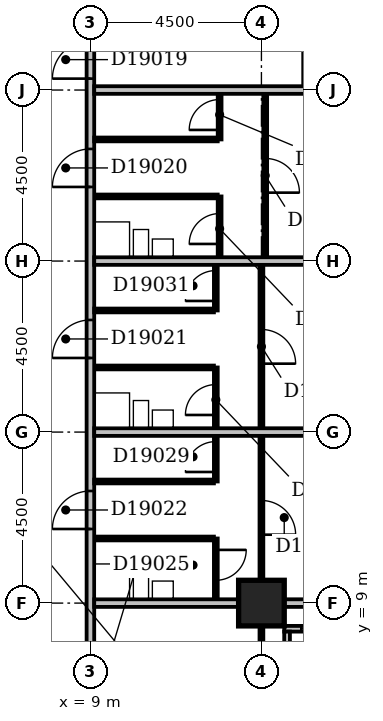
"""IFC4 building model, lengths in metres.
Left out: names, types, materials, properties, quantities, classifications, styles, units other than length and angle.
Written with IfcOpenShell. Run it as: python <this file> out.ifc"""

import sys

from ifc_helpers import new_model, si_unit, direction, frame, frame_2d, origin, origin_2d, place, context, subcontext, project, spatial, rectangle, extrude, element, fill, save


model = new_model("IFC4")
c1 = context("Model", 3, precision=1e-05, world=origin(), true_north=direction((0.0, 1.0)))
c2 = subcontext(c1, "Body", "Model", "MODEL_VIEW")
j1 = project(units=[si_unit("LENGTHUNIT", "METRE"), si_unit("PLANEANGLEUNIT", "RADIAN")], contexts=[c1])
p1 = place(None, origin())
s1 = spatial("IfcSite", under=j1, at=p1, CompositionType="ELEMENT")
p2 = place(p1, origin())
s2 = spatial("IfcBuilding", under=s1, at=p2, CompositionType="ELEMENT")
p3 = place(p2, frame((0.0, 0.0, 79.4)))
s3 = spatial("IfcBuildingStorey", under=s2, at=p3, CompositionType="ELEMENT", Elevation=79.4)
p4 = place(p3, frame((13.5, 9.0, -0.3), z_axis=(0.0, 0.0, 1.0), x_axis=(1.0, 0.0, 0.0)))
e1 = element("IfcColumn", 1, at=p4, inside=s3, PredefinedType="COLUMN", context=c2, shape_type="SweptSolid", body=[
    extrude(rectangle(XDim=1.2, YDim=1.2, at=origin_2d()), origin(), (0.0, 0.0, 1.0), 3.6),
])
p5 = place(p3, frame((14.175, 3.9, 0.0), z_axis=(0.0, 0.0, 1.0), x_axis=(0.0, 1.0, 0.0)))
e2 = element("IfcWall", 2, at=p5, inside=s3, PredefinedType="STANDARD", context=c2, shape_type="SweptSolid", body=[
    extrude(rectangle(XDim=4.35, YDim=0.15, at=frame_2d((2.175, 0.0))), origin(), (0.0, 0.0, 1.0), 2.7),
])
p6 = place(p5, frame((1.65, 0.0, 0.6)))
e3 = element("IfcOpeningElement", 3, at=p6, cuts=e2, PredefinedType="OPENING", context=c2, shape_type="SweptSolid", body=[
    extrude(rectangle(XDim=2.4, YDim=1.8, at=frame_2d((1.2, 0.9))), frame((0.0, 0.087, 0.0), z_axis=(0.0, -1.0, 0.0), x_axis=(1.0, 0.0, 0.0)), (0.0, 0.0, 1.0), 0.174),
])
p7 = place(p3, frame((14.1, 8.325, 0.0), z_axis=(0.0, 0.0, 1.0), x_axis=(1.0, 0.0, 0.0)))
e4 = element("IfcWall", 4, at=p7, inside=s3, PredefinedType="STANDARD", context=c2, shape_type="SweptSolid", body=[
    extrude(rectangle(XDim=4.65, YDim=0.15, at=frame_2d((2.325, 0.0))), origin(), (0.0, 0.0, 1.0), 2.7),
])
p8 = place(p7, frame((0.45, 0.0, 0.6)))
e5 = element("IfcOpeningElement", 5, at=p8, cuts=e4, PredefinedType="OPENING", context=c2, shape_type="SweptSolid", body=[
    extrude(rectangle(XDim=2.4, YDim=1.8, at=frame_2d((1.2, 0.9))), frame((0.0, 0.087, 0.0), z_axis=(0.0, -1.0, 0.0), x_axis=(1.0, 0.0, 0.0)), (0.0, 0.0, 1.0), 0.174),
])
p9 = place(p3, frame((9.0, 5.0, 0.0), z_axis=(0.0, 0.0, 1.0), x_axis=(0.0, 1.0, 0.0)))
e6 = element("IfcWall", 6, at=p9, inside=s3, PredefinedType="PARTITIONING", context=c2, shape_type="SweptSolid", body=[
    extrude(rectangle(XDim=44.5, YDim=0.2, at=frame_2d((22.25, 0.0))), origin(), (0.0, 0.0, 1.0), 3.3),
])
p10 = place(p9, frame((17.8, 0.0, 0.0)))
e7 = element("IfcOpeningElement", 7, at=p10, cuts=e6, PredefinedType="OPENING", context=c2, shape_type="SweptSolid", body=[
    extrude(rectangle(XDim=1.0, YDim=2.1, at=frame_2d((0.5, 1.05))), frame((0.0, 0.112, 0.0), z_axis=(0.0, -1.0, 0.0), x_axis=(1.0, 0.0, 0.0)), (0.0, 0.0, 1.0), 0.224),
])
p11 = place(p9, frame((14.95, 0.0, 0.0)))
e8 = element("IfcOpeningElement", 8, at=p11, cuts=e6, PredefinedType="OPENING", context=c2, shape_type="SweptSolid", body=[
    extrude(rectangle(XDim=1.0, YDim=2.1, at=frame_2d((0.5, 1.05))), frame((0.0, 0.112, 0.0), z_axis=(0.0, -1.0, 0.0), x_axis=(1.0, 0.0, 0.0)), (0.0, 0.0, 1.0), 0.224),
])
p12 = place(p9, frame((10.45, 0.0, 0.0)))
e9 = element("IfcOpeningElement", 9, at=p12, cuts=e6, PredefinedType="OPENING", context=c2, shape_type="SweptSolid", body=[
    extrude(rectangle(XDim=1.0, YDim=2.1, at=frame_2d((0.5, 1.05))), frame((0.0, 0.112, 0.0), z_axis=(0.0, -1.0, 0.0), x_axis=(1.0, 0.0, 0.0)), (0.0, 0.0, 1.0), 0.224),
])
p13 = place(p9, frame((5.95, 0.0, 0.0)))
e10 = element("IfcOpeningElement", 10, at=p13, cuts=e6, PredefinedType="OPENING", context=c2, shape_type="SweptSolid", body=[
    extrude(rectangle(XDim=1.0, YDim=2.1, at=frame_2d((0.5, 1.05))), frame((0.0, 0.112, 0.0), z_axis=(0.0, -1.0, 0.0), x_axis=(1.0, 0.0, 0.0)), (0.0, 0.0, 1.0), 0.224),
])
p14 = place(p9, frame((35.0, 0.0, 0.0)))
e11 = element("IfcOpeningElement", 11, at=p14, cuts=e6, PredefinedType="OPENING", context=c2, shape_type="SweptSolid", body=[
    extrude(rectangle(XDim=0.9, YDim=2.1, at=frame_2d((0.45, 1.05))), frame((0.0, 0.112, 0.0), z_axis=(0.0, -1.0, 0.0), x_axis=(1.0, 0.0, 0.0)), (0.0, 0.0, 1.0), 0.224),
])
p15 = place(p9, frame((1.5, 0.0, 0.0)))
e12 = element("IfcOpeningElement", 12, at=p15, cuts=e6, PredefinedType="OPENING", context=c2, shape_type="SweptSolid", body=[
    extrude(rectangle(XDim=0.9, YDim=2.1, at=frame_2d((0.45, 1.05))), frame((0.0, 0.112, 0.0), z_axis=(0.0, -1.0, 0.0), x_axis=(1.0, 0.0, 0.0)), (0.0, 0.0, 1.0), 0.224),
])
p16 = place(p3, frame((13.5, 5.1, 0.0), z_axis=(0.0, 0.0, 1.0), x_axis=(0.0, 1.0, 0.0)))
e13 = element("IfcWall", 13, at=p16, inside=s3, PredefinedType="PARTITIONING", context=c2, shape_type="SweptSolid", body=[
    extrude(rectangle(XDim=3.3, YDim=0.1, at=frame_2d((1.65, 0.0))), origin(), (0.0, 0.0, 1.0), 2.7),
])
p17 = place(p3, frame((9.1, 9.0, 0.0), z_axis=(0.0, 0.0, 1.0), x_axis=(1.0, 0.0, 0.0)))
e14 = element("IfcWall", 14, at=p17, inside=s3, PredefinedType="PARTITIONING", context=c2, shape_type="SweptSolid", body=[
    extrude(rectangle(XDim=3.8, YDim=0.2, at=frame_2d((1.9, 0.0))), origin(), (0.0, 0.0, 1.0), 3.3),
])
p18 = place(p3, frame((14.1, 9.0, 0.0), z_axis=(0.0, 0.0, 1.0), x_axis=(1.0, 0.0, 0.0)))
e15 = element("IfcWall", 15, at=p18, inside=s3, PredefinedType="PARTITIONING", context=c2, shape_type="SweptSolid", body=[
    extrude(rectangle(XDim=3.3, YDim=0.2, at=frame_2d((1.65, 0.0))), origin(), (0.0, 0.0, 1.0), 2.7),
])
p19 = place(p3, frame((12.3, 9.1, 0.0), z_axis=(0.0, 0.0, 1.0), x_axis=(0.0, 1.0, 0.0)))
e16 = element("IfcWall", 16, at=p19, inside=s3, PredefinedType="PARTITIONING", context=c2, shape_type="SweptSolid", body=[
    extrude(rectangle(XDim=1.6, YDim=0.1, at=frame_2d((0.8, 0.0))), origin(), (0.0, 0.0, 1.0), 3.3),
])
p20 = place(p19, frame((0.5, 0.0, 0.0)))
e17 = element("IfcOpeningElement", 17, at=p20, cuts=e16, PredefinedType="OPENING", context=c2, shape_type="SweptSolid", body=[
    extrude(rectangle(XDim=0.8, YDim=2.1, at=frame_2d((0.4, 1.05))), frame((0.0, 0.062, 0.0), z_axis=(0.0, -1.0, 0.0), x_axis=(1.0, 0.0, 0.0)), (0.0, 0.0, 1.0), 0.124),
])
p21 = place(p3, frame((13.5, 9.6, 0.0), z_axis=(0.0, 0.0, 1.0), x_axis=(0.0, 1.0, 0.0)))
e18 = element("IfcWall", 18, at=p21, inside=s3, PredefinedType="PARTITIONING", context=c2, shape_type="SweptSolid", body=[
    extrude(rectangle(XDim=8.3, YDim=0.1, at=frame_2d((4.15, 0.0))), origin(), (0.0, 0.0, 1.0), 3.3),
])
p22 = place(p21, frame((5.7, 0.0, 0.0)))
e19 = element("IfcOpeningElement", 19, at=p22, cuts=e18, PredefinedType="OPENING", context=c2, shape_type="SweptSolid", body=[
    extrude(rectangle(XDim=0.9, YDim=2.1, at=frame_2d((0.45, 1.05))), frame((0.0, 0.062, 0.0), z_axis=(0.0, -1.0, 0.0), x_axis=(1.0, 0.0, 0.0)), (0.0, 0.0, 1.0), 0.124),
])
p23 = place(p21, frame((1.2, 0.0, 0.0)))
e20 = element("IfcOpeningElement", 20, at=p23, cuts=e18, PredefinedType="OPENING", context=c2, shape_type="SweptSolid", body=[
    extrude(rectangle(XDim=0.9, YDim=2.1, at=frame_2d((0.45, 1.05))), frame((0.0, 0.062, 0.0), z_axis=(0.0, -1.0, 0.0), x_axis=(1.0, 0.0, 0.0)), (0.0, 0.0, 1.0), 0.124),
])
p24 = place(p3, frame((9.1, 10.7, 0.0), z_axis=(0.0, 0.0, 1.0), x_axis=(1.0, 0.0, 0.0)))
e21 = element("IfcWall", 21, at=p24, inside=s3, PredefinedType="PLUMBINGWALL", context=c2, shape_type="SweptSolid", body=[
    extrude(rectangle(XDim=3.15, YDim=0.1, at=frame_2d((1.575, 0.0))), origin(), (0.0, 0.0, 1.0), 3.3),
])
p25 = place(p3, frame((9.1, 12.2, 0.0), z_axis=(0.0, 0.0, 1.0), x_axis=(1.0, 0.0, 0.0)))
e22 = element("IfcWall", 22, at=p25, inside=s3, PredefinedType="PARTITIONING", context=c2, shape_type="SweptSolid", body=[
    extrude(rectangle(XDim=3.15, YDim=0.1, at=frame_2d((1.575, 0.0))), origin(), (0.0, 0.0, 1.0), 3.3),
])
p26 = place(p3, frame((12.3, 12.2, 0.0), z_axis=(0.0, 0.0, 1.0), x_axis=(0.0, 1.0, 0.0)))
e23 = element("IfcWall", 23, at=p26, inside=s3, PredefinedType="PARTITIONING", context=c2, shape_type="SweptSolid", body=[
    extrude(rectangle(XDim=3.0, YDim=0.1, at=frame_2d((1.5, 0.0))), origin(), (0.0, 0.0, 1.0), 3.3),
])
p27 = place(p26, frame((1.75, 0.0, 0.0)))
e24 = element("IfcOpeningElement", 24, at=p27, cuts=e23, PredefinedType="OPENING", context=c2, shape_type="SweptSolid", body=[
    extrude(rectangle(XDim=0.8, YDim=2.1, at=frame_2d((0.4, 1.05))), frame((0.0, 0.062, 0.0), z_axis=(0.0, -1.0, 0.0), x_axis=(1.0, 0.0, 0.0)), (0.0, 0.0, 1.0), 0.124),
])
p28 = place(p26, frame((0.25, 0.0, 0.0)))
e25 = element("IfcOpeningElement", 25, at=p28, cuts=e23, PredefinedType="OPENING", context=c2, shape_type="SweptSolid", body=[
    extrude(rectangle(XDim=0.8, YDim=2.1, at=frame_2d((0.4, 1.05))), frame((0.0, 0.062, 0.0), z_axis=(0.0, -1.0, 0.0), x_axis=(1.0, 0.0, 0.0)), (0.0, 0.0, 1.0), 0.124),
])
p29 = place(p3, frame((9.1, 13.5, 0.0), z_axis=(0.0, 0.0, 1.0), x_axis=(1.0, 0.0, 0.0)))
e26 = element("IfcWall", 26, at=p29, inside=s3, PredefinedType="PARTITIONING", context=c2, shape_type="SweptSolid", body=[
    extrude(rectangle(XDim=8.3, YDim=0.2, at=frame_2d((4.15, 0.0))), origin(), (0.0, 0.0, 1.0), 3.3),
])
p30 = place(p3, frame((9.1, 15.2, 0.0), z_axis=(0.0, 0.0, 1.0), x_axis=(1.0, 0.0, 0.0)))
e27 = element("IfcWall", 27, at=p30, inside=s3, PredefinedType="PLUMBINGWALL", context=c2, shape_type="SweptSolid", body=[
    extrude(rectangle(XDim=3.15, YDim=0.1, at=frame_2d((1.575, 0.0))), origin(), (0.0, 0.0, 1.0), 3.3),
])
p31 = place(p3, frame((9.1, 16.7, 0.0), z_axis=(0.0, 0.0, 1.0), x_axis=(1.0, 0.0, 0.0)))
e28 = element("IfcWall", 28, at=p31, inside=s3, PredefinedType="PARTITIONING", context=c2, shape_type="SweptSolid", body=[
    extrude(rectangle(XDim=3.15, YDim=0.1, at=frame_2d((1.575, 0.0))), origin(), (0.0, 0.0, 1.0), 3.3),
])
p32 = place(p3, frame((12.3, 16.7, 0.0), z_axis=(0.0, 0.0, 1.0), x_axis=(0.0, 1.0, 0.0)))
e29 = element("IfcWall", 29, at=p32, inside=s3, PredefinedType="PARTITIONING", context=c2, shape_type="SweptSolid", body=[
    extrude(rectangle(XDim=1.2, YDim=0.1, at=frame_2d((0.6, 0.0))), origin(), (0.0, 0.0, 1.0), 3.3),
])
p33 = place(p32, frame((0.25, 0.0, 0.0)))
e30 = element("IfcOpeningElement", 30, at=p33, cuts=e29, PredefinedType="OPENING", context=c2, shape_type="SweptSolid", body=[
    extrude(rectangle(XDim=0.8, YDim=2.1, at=frame_2d((0.4, 1.05))), frame((0.0, 0.062, 0.0), z_axis=(0.0, -1.0, 0.0), x_axis=(1.0, 0.0, 0.0)), (0.0, 0.0, 1.0), 0.124),
])
p34 = place(p3, frame((9.1, 18.0, 0.0), z_axis=(0.0, 0.0, 1.0), x_axis=(1.0, 0.0, 0.0)))
e31 = element("IfcWall", 31, at=p34, inside=s3, PredefinedType="PARTITIONING", context=c2, shape_type="SweptSolid", body=[
    extrude(rectangle(XDim=8.3, YDim=0.2, at=frame_2d((4.15, 0.0))), origin(), (0.0, 0.0, 1.0), 2.6),
])
p35 = place(p3, frame((12.4, 18.1, 0.0), z_axis=(0.0, 0.0, 1.0), x_axis=(0.0, 1.0, 0.0)))
e32 = element("IfcWall", 32, at=p35, inside=s3, PredefinedType="PARTITIONING", context=c2, shape_type="SweptSolid", body=[
    extrude(rectangle(XDim=1.6, YDim=0.1, at=frame_2d((0.8, 0.0))), origin(), (0.0, 0.0, 1.0), 3.3),
])
p36 = place(p35, frame((0.35, 0.0, 0.0)))
e33 = element("IfcOpeningElement", 33, at=p36, cuts=e32, PredefinedType="OPENING", context=c2, shape_type="SweptSolid", body=[
    extrude(rectangle(XDim=0.8, YDim=2.1, at=frame_2d((0.4, 1.05))), frame((0.0, 0.062, 0.0), z_axis=(0.0, -1.0, 0.0), x_axis=(1.0, 0.0, 0.0)), (0.0, 0.0, 1.0), 0.124),
])
p37 = place(p3, frame((13.6, 18.1, 0.0), z_axis=(0.0, 0.0, 1.0), x_axis=(0.0, 1.0, 0.0)))
e34 = element("IfcWall", 34, at=p37, inside=s3, PredefinedType="PARTITIONING", context=c2, shape_type="SweptSolid", body=[
    extrude(rectangle(XDim=4.3, YDim=0.1, at=frame_2d((2.15, 0.0))), origin(), (0.0, 0.0, 1.0), 3.3),
])
p38 = place(p37, frame((1.7, 0.0, 0.0)))
e35 = element("IfcOpeningElement", 35, at=p38, cuts=e34, PredefinedType="OPENING", context=c2, shape_type="SweptSolid", body=[
    extrude(rectangle(XDim=0.9, YDim=2.1, at=frame_2d((0.45, 1.05))), frame((0.0, 0.062, 0.0), z_axis=(0.0, -1.0, 0.0), x_axis=(1.0, 0.0, 0.0)), (0.0, 0.0, 1.0), 0.124),
])
p39 = place(p3, frame((9.1, 19.7, 0.0), z_axis=(0.0, 0.0, 1.0), x_axis=(1.0, 0.0, 0.0)))
e36 = element("IfcWall", 36, at=p39, inside=s3, PredefinedType="PLUMBINGWALL", context=c2, shape_type="SweptSolid", body=[
    extrude(rectangle(XDim=3.25, YDim=0.1, at=frame_2d((1.625, 0.0))), origin(), (0.0, 0.0, 1.0), 3.3),
])
p40 = place(p3, frame((9.1, 21.2, 0.0), z_axis=(0.0, 0.0, 1.0), x_axis=(1.0, 0.0, 0.0)))
e37 = element("IfcWall", 37, at=p40, inside=s3, PredefinedType="PARTITIONING", context=c2, shape_type="SweptSolid", body=[
    extrude(rectangle(XDim=3.25, YDim=0.1, at=frame_2d((1.625, 0.0))), origin(), (0.0, 0.0, 1.0), 3.3),
])
p41 = place(p3, frame((12.4, 21.2, 0.0), z_axis=(0.0, 0.0, 1.0), x_axis=(0.0, 1.0, 0.0)))
e38 = element("IfcWall", 38, at=p41, inside=s3, PredefinedType="PARTITIONING", context=c2, shape_type="SweptSolid", body=[
    extrude(rectangle(XDim=1.2, YDim=0.1, at=frame_2d((0.6, 0.0))), origin(), (0.0, 0.0, 1.0), 3.3),
])
p42 = place(p41, frame((0.25, 0.0, 0.0)))
e39 = element("IfcOpeningElement", 39, at=p42, cuts=e38, PredefinedType="OPENING", context=c2, shape_type="SweptSolid", body=[
    extrude(rectangle(XDim=0.8, YDim=2.1, at=frame_2d((0.4, 1.05))), frame((0.0, 0.062, 0.0), z_axis=(0.0, -1.0, 0.0), x_axis=(1.0, 0.0, 0.0)), (0.0, 0.0, 1.0), 0.124),
])
p43 = place(p3, frame((9.1, 22.5, 0.0), z_axis=(0.0, 0.0, 1.0), x_axis=(1.0, 0.0, 0.0)))
e40 = element("IfcWall", 40, at=p43, inside=s3, PredefinedType="PARTITIONING", context=c2, shape_type="SweptSolid", body=[
    extrude(rectangle(XDim=12.8, YDim=0.2, at=frame_2d((6.4, 0.0))), origin(), (0.0, 0.0, 1.0), 3.3),
])
p44 = place(p3, frame((14.65, 22.6, 0.0), z_axis=(0.0, 0.0, 1.0), x_axis=(0.0, 1.0, 0.0)))
e41 = element("IfcWall", 41, at=p44, inside=s3, PredefinedType="PARTITIONING", context=c2, shape_type="SweptSolid", body=[
    extrude(rectangle(XDim=13.3, YDim=0.1, at=frame_2d((6.65, 0.0))), origin(), (0.0, 0.0, 1.0), 3.3),
])
p45 = place(p44, frame((1.7, 0.0, 0.0)))
e42 = element("IfcOpeningElement", 42, at=p45, cuts=e41, PredefinedType="OPENING", context=c2, shape_type="SweptSolid", body=[
    extrude(rectangle(XDim=0.9, YDim=2.1, at=frame_2d((0.45, 1.05))), frame((0.0, 0.062, 0.0), z_axis=(0.0, -1.0, 0.0), x_axis=(1.0, 0.0, 0.0)), (0.0, 0.0, 1.0), 0.124),
])
p46 = place(p44, frame((6.2, 0.0, 0.0)))
e43 = element("IfcOpeningElement", 43, at=p46, cuts=e41, PredefinedType="OPENING", context=c2, shape_type="SweptSolid", body=[
    extrude(rectangle(XDim=0.9, YDim=2.1, at=frame_2d((0.45, 1.05))), frame((0.0, 0.062, 0.0), z_axis=(0.0, -1.0, 0.0), x_axis=(1.0, 0.0, 0.0)), (0.0, 0.0, 1.0), 0.124),
])
p47 = place(p44, frame((10.7, 0.0, 0.0)))
e44 = element("IfcOpeningElement", 44, at=p47, cuts=e41, PredefinedType="OPENING", context=c2, shape_type="SweptSolid", body=[
    extrude(rectangle(XDim=0.9, YDim=2.1, at=frame_2d((0.45, 1.05))), frame((0.0, 0.062, 0.0), z_axis=(0.0, -1.0, 0.0), x_axis=(1.0, 0.0, 0.0)), (0.0, 0.0, 1.0), 0.124),
])
p48 = place(p8, origin())
e45 = element("IfcWindow", 45, at=p48, inside=s3, PartitioningType="SINGLE_PANEL", PredefinedType="WINDOW", context=c2, shape_type="SweptSolid", body=[
    extrude(rectangle(XDim=2.4, YDim=1.8, at=frame_2d((1.2, 0.9))), frame((0.0, 0.03, 0.0), z_axis=(0.0, -1.0, 0.0), x_axis=(1.0, 0.0, 0.0)), (0.0, 0.0, 1.0), 0.06),
])
fill(e5, e45)
p49 = place(p10, origin())
e46 = element("IfcDoor", 46, at=p49, inside=s3, OperationType="SINGLE_SWING_LEFT", PredefinedType="DOOR", context=c2, shape_type="SweptSolid", body=[
    extrude(rectangle(XDim=1.0, YDim=2.1, at=frame_2d((0.5, 1.05))), frame((0.0, 0.025, 0.0), z_axis=(0.0, -1.0, 0.0), x_axis=(1.0, 0.0, 0.0)), (0.0, 0.0, 1.0), 0.05),
])
fill(e7, e46)
p50 = place(p11, origin())
e47 = element("IfcDoor", 47, at=p50, inside=s3, OperationType="SINGLE_SWING_LEFT", PredefinedType="DOOR", context=c2, shape_type="SweptSolid", body=[
    extrude(rectangle(XDim=1.0, YDim=2.1, at=frame_2d((0.5, 1.05))), frame((0.0, 0.025, 0.0), z_axis=(0.0, -1.0, 0.0), x_axis=(1.0, 0.0, 0.0)), (0.0, 0.0, 1.0), 0.05),
])
fill(e8, e47)
p51 = place(p12, origin())
e48 = element("IfcDoor", 48, at=p51, inside=s3, OperationType="SINGLE_SWING_LEFT", PredefinedType="DOOR", context=c2, shape_type="SweptSolid", body=[
    extrude(rectangle(XDim=1.0, YDim=2.1, at=frame_2d((0.5, 1.05))), frame((0.0, 0.025, 0.0), z_axis=(0.0, -1.0, 0.0), x_axis=(1.0, 0.0, 0.0)), (0.0, 0.0, 1.0), 0.05),
])
fill(e9, e48)
p52 = place(p13, origin())
e49 = element("IfcDoor", 49, at=p52, inside=s3, OperationType="SINGLE_SWING_LEFT", PredefinedType="DOOR", context=c2, shape_type="SweptSolid", body=[
    extrude(rectangle(XDim=1.0, YDim=2.1, at=frame_2d((0.5, 1.05))), frame((0.0, 0.025, 0.0), z_axis=(0.0, -1.0, 0.0), x_axis=(1.0, 0.0, 0.0)), (0.0, 0.0, 1.0), 0.05),
])
fill(e10, e49)
p53 = place(p20, origin())
e50 = element("IfcDoor", 50, at=p53, inside=s3, OperationType="SINGLE_SWING_RIGHT", PredefinedType="DOOR", context=c2, shape_type="SweptSolid", body=[
    extrude(rectangle(XDim=0.8, YDim=2.1, at=frame_2d((0.4, 1.05))), frame((0.0, 0.025, 0.0), z_axis=(0.0, -1.0, 0.0), x_axis=(1.0, 0.0, 0.0)), (0.0, 0.0, 1.0), 0.05),
])
fill(e17, e50)
p54 = place(p22, frame((0.9, 0.0, 0.0), z_axis=(0.0, 0.0, 1.0), x_axis=(-1.0, 0.0, 0.0)))
e51 = element("IfcDoor", 51, at=p54, inside=s3, OperationType="SINGLE_SWING_RIGHT", PredefinedType="DOOR", context=c2, shape_type="SweptSolid", body=[
    extrude(rectangle(XDim=0.9, YDim=2.1, at=frame_2d((0.45, 1.05))), frame((0.0, 0.025, 0.0), z_axis=(0.0, -1.0, 0.0), x_axis=(1.0, 0.0, 0.0)), (0.0, 0.0, 1.0), 0.05),
])
fill(e19, e51)
p55 = place(p23, frame((0.9, 0.0, 0.0), z_axis=(0.0, 0.0, 1.0), x_axis=(-1.0, 0.0, 0.0)))
e52 = element("IfcDoor", 52, at=p55, inside=s3, OperationType="SINGLE_SWING_RIGHT", PredefinedType="DOOR", context=c2, shape_type="SweptSolid", body=[
    extrude(rectangle(XDim=0.9, YDim=2.1, at=frame_2d((0.45, 1.05))), frame((0.0, 0.025, 0.0), z_axis=(0.0, -1.0, 0.0), x_axis=(1.0, 0.0, 0.0)), (0.0, 0.0, 1.0), 0.05),
])
fill(e20, e52)
p56 = place(p27, origin())
e53 = element("IfcDoor", 53, at=p56, inside=s3, OperationType="SINGLE_SWING_LEFT", PredefinedType="DOOR", context=c2, shape_type="SweptSolid", body=[
    extrude(rectangle(XDim=0.8, YDim=2.1, at=frame_2d((0.4, 1.05))), frame((0.0, 0.025, 0.0), z_axis=(0.0, -1.0, 0.0), x_axis=(1.0, 0.0, 0.0)), (0.0, 0.0, 1.0), 0.05),
])
fill(e24, e53)
p57 = place(p28, origin())
e54 = element("IfcDoor", 54, at=p57, inside=s3, OperationType="SINGLE_SWING_LEFT", PredefinedType="DOOR", context=c2, shape_type="SweptSolid", body=[
    extrude(rectangle(XDim=0.8, YDim=2.1, at=frame_2d((0.4, 1.05))), frame((0.0, 0.025, 0.0), z_axis=(0.0, -1.0, 0.0), x_axis=(1.0, 0.0, 0.0)), (0.0, 0.0, 1.0), 0.05),
])
fill(e25, e54)
p58 = place(p33, origin())
e55 = element("IfcDoor", 55, at=p58, inside=s3, OperationType="SINGLE_SWING_LEFT", PredefinedType="DOOR", context=c2, shape_type="SweptSolid", body=[
    extrude(rectangle(XDim=0.8, YDim=2.1, at=frame_2d((0.4, 1.05))), frame((0.0, 0.025, 0.0), z_axis=(0.0, -1.0, 0.0), x_axis=(1.0, 0.0, 0.0)), (0.0, 0.0, 1.0), 0.05),
])
fill(e30, e55)
p59 = place(p36, origin())
e56 = element("IfcDoor", 56, at=p59, inside=s3, OperationType="SINGLE_SWING_LEFT", PredefinedType="DOOR", context=c2, shape_type="SweptSolid", body=[
    extrude(rectangle(XDim=0.8, YDim=2.1, at=frame_2d((0.4, 1.05))), frame((0.0, 0.025, 0.0), z_axis=(0.0, -1.0, 0.0), x_axis=(1.0, 0.0, 0.0)), (0.0, 0.0, 1.0), 0.05),
])
fill(e33, e56)
p60 = place(p38, frame((0.9, 0.0, 0.0), z_axis=(0.0, 0.0, 1.0), x_axis=(-1.0, 0.0, 0.0)))
e57 = element("IfcDoor", 57, at=p60, inside=s3, OperationType="SINGLE_SWING_RIGHT", PredefinedType="DOOR", context=c2, shape_type="SweptSolid", body=[
    extrude(rectangle(XDim=0.9, YDim=2.1, at=frame_2d((0.45, 1.05))), frame((0.0, 0.025, 0.0), z_axis=(0.0, -1.0, 0.0), x_axis=(1.0, 0.0, 0.0)), (0.0, 0.0, 1.0), 0.05),
])
fill(e35, e57)
p61 = place(p42, origin())
e58 = element("IfcDoor", 58, at=p61, inside=s3, OperationType="SINGLE_SWING_LEFT", PredefinedType="DOOR", context=c2, shape_type="SweptSolid", body=[
    extrude(rectangle(XDim=0.8, YDim=2.1, at=frame_2d((0.4, 1.05))), frame((0.0, 0.025, 0.0), z_axis=(0.0, -1.0, 0.0), x_axis=(1.0, 0.0, 0.0)), (0.0, 0.0, 1.0), 0.05),
])
fill(e39, e58)
save(model, sys.argv[1])
